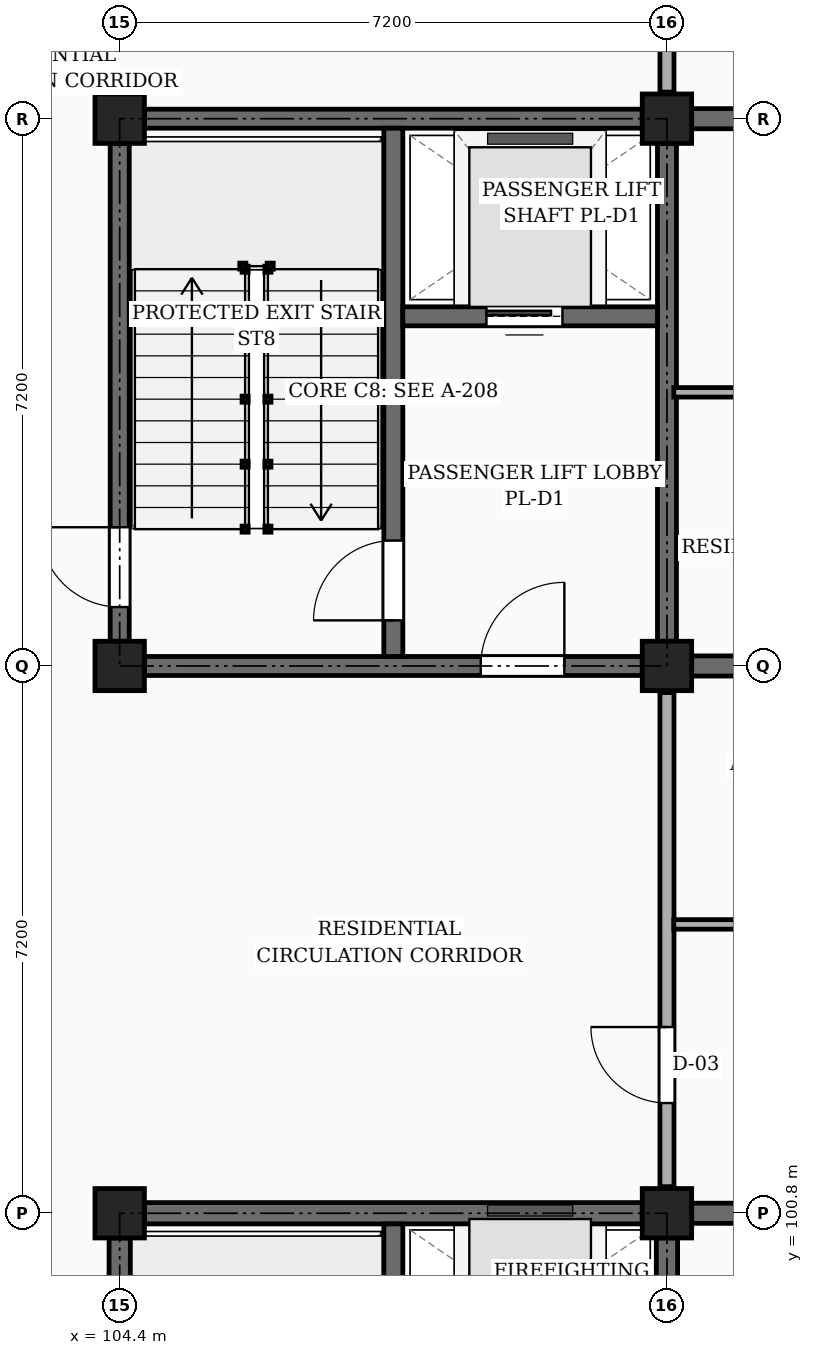
"""IFC4 building model, lengths in metres.
Left out: names, types, materials, properties, quantities, classifications, styles, units other than length and angle.
Written with IfcOpenShell. Run it as: python <this file> out.ifc"""

import sys

from ifc_helpers import new_model, si_unit, direction, frame, frame_2d, origin, origin_2d, place, context, subcontext, project, spatial, rectangle, extrude, element, fill, save


model = new_model("IFC4")
c1 = context("Model", 3, precision=1e-05, world=origin(), true_north=direction((0.0, 1.0)))
c2 = subcontext(c1, "Body", "Model", "MODEL_VIEW")
j1 = project(units=[si_unit("LENGTHUNIT", "METRE"), si_unit("PLANEANGLEUNIT", "RADIAN")], contexts=[c1])
p1 = place(None, origin())
s1 = spatial("IfcSite", under=j1, at=p1, CompositionType="ELEMENT")
p2 = place(p1, origin())
s2 = spatial("IfcBuilding", under=s1, at=p2, CompositionType="ELEMENT")
p3 = place(p2, origin())
s3 = spatial("IfcBuildingStorey", under=s2, at=p3, CompositionType="ELEMENT", Elevation=0.0)
for number, where, z_axis, x_axis in (
    (1, (104.4, 100.8, 0.0), (0.0, 0.0, 1.0), (1.0, 0.0, 0.0)),
    (2, (104.4, 108.0, 0.0), (0.0, 0.0, 1.0), (1.0, 0.0, 0.0)),
    (3, (104.4, 115.2, 0.0), (0.0, 0.0, 1.0), (1.0, 0.0, 0.0)),
    (4, (111.6, 100.8, 0.0), (0.0, 0.0, 1.0), (1.0, 0.0, 0.0)),
    (5, (111.6, 108.0, 0.0), (0.0, 0.0, 1.0), (1.0, 0.0, 0.0)),
    (6, (111.6, 115.2, 0.0), (0.0, 0.0, 1.0), (1.0, 0.0, 0.0)),
):
    element("IfcColumn", number, at=place(p3, frame(where, z_axis=z_axis, x_axis=x_axis)), inside=s3, PredefinedType="COLUMN", context=c2, shape_type="SweptSolid", body=[
        extrude(rectangle(XDim=0.65, YDim=0.65, at=origin_2d()), origin(), (0.0, 0.0, 1.0), 4.5),
    ])
p4 = place(p3, frame((111.925, 100.8, 0.0), z_axis=(0.0, 0.0, 1.0), x_axis=(1.0, 0.0, 0.0)))
e7 = element("IfcWall", 7, at=p4, inside=s3, PredefinedType="SOLIDWALL", context=c2, shape_type="SweptSolid", body=[
    extrude(rectangle(XDim=6.615, YDim=0.265, at=frame_2d((3.308, 0.0))), origin(), (0.0, 0.0, 1.0), 3.54),
])
p5 = place(p3, frame((111.925, 108.0, 0.0), z_axis=(0.0, 0.0, 1.0), x_axis=(1.0, 0.0, 0.0)))
e8 = element("IfcWall", 8, at=p5, inside=s3, PredefinedType="SOLIDWALL", context=c2, shape_type="SweptSolid", body=[
    extrude(rectangle(XDim=6.575, YDim=0.265, at=frame_2d((3.288, 0.0))), origin(), (0.0, 0.0, 1.0), 3.54),
])
p6 = place(p5, frame((4.35, 0.0, 0.0)))
e9 = element("IfcOpeningElement", 9, at=p6, cuts=e8, PredefinedType="OPENING", context=c2, shape_type="SweptSolid", body=[
    extrude(rectangle(XDim=0.98, YDim=2.12, at=frame_2d((0.49, 1.06))), frame((0.0, 0.143, 0.0), z_axis=(0.0, -1.0, 0.0), x_axis=(1.0, 0.0, 0.0)), (0.0, 0.0, 1.0), 0.285),
])
p7 = place(p3, frame((111.925, 115.2, 0.0), z_axis=(0.0, 0.0, 1.0), x_axis=(1.0, 0.0, 0.0)))
e10 = element("IfcWall", 10, at=p7, inside=s3, PredefinedType="SOLIDWALL", context=c2, shape_type="SweptSolid", body=[
    extrude(rectangle(XDim=6.575, YDim=0.265, at=frame_2d((3.288, 0.0))), origin(), (0.0, 0.0, 1.0), 3.54),
])
p8 = place(p3, frame((104.4, 93.925, 0.0), z_axis=(0.0, 0.0, 1.0), x_axis=(0.0, 1.0, 0.0)))
e11 = element("IfcWall", 11, at=p8, inside=s3, PredefinedType="SHEAR", context=c2, shape_type="SweptSolid", body=[
    extrude(rectangle(XDim=6.55, YDim=0.28, at=frame_2d((3.275, 0.0))), origin(), (0.0, 0.0, 1.0), 4.24),
])
p9 = place(p8, frame((0.45, 0.0, 0.0)))
e12 = element("IfcOpeningElement", 12, at=p9, cuts=e11, PredefinedType="OPENING", context=c2, shape_type="SweptSolid", body=[
    extrude(rectangle(XDim=1.05, YDim=2.15, at=frame_2d((0.525, 1.075))), frame((0.0, 0.15, 0.0), z_axis=(0.0, -1.0, 0.0), x_axis=(1.0, 0.0, 0.0)), (0.0, 0.0, 1.0), 0.3),
])
p10 = place(p3, frame((104.725, 100.8, 0.0), z_axis=(0.0, 0.0, 1.0), x_axis=(1.0, 0.0, 0.0)))
e13 = element("IfcWall", 13, at=p10, inside=s3, PredefinedType="SHEAR", context=c2, shape_type="SweptSolid", body=[
    extrude(rectangle(XDim=6.55, YDim=0.28, at=frame_2d((3.275, 0.0))), origin(), (0.0, 0.0, 1.0), 4.24),
])
p11 = place(p3, frame((111.6, 93.925, 0.0), z_axis=(0.0, 0.0, 1.0), x_axis=(0.0, 1.0, 0.0)))
e14 = element("IfcWall", 14, at=p11, inside=s3, PredefinedType="SHEAR", context=c2, shape_type="SweptSolid", body=[
    extrude(rectangle(XDim=6.55, YDim=0.28, at=frame_2d((3.275, 0.0))), origin(), (0.0, 0.0, 1.0), 4.24),
])
p12 = place(p3, frame((108.0, 93.74, 0.0), z_axis=(0.0, 0.0, 1.0), x_axis=(0.0, 1.0, 0.0)))
e15 = element("IfcWall", 15, at=p12, inside=s3, PredefinedType="SHEAR", context=c2, shape_type="SweptSolid", body=[
    extrude(rectangle(XDim=6.92, YDim=0.25, at=frame_2d((3.46, 0.0))), origin(), (0.0, 0.0, 1.0), 4.24),
])
p13 = place(p12, frame((0.46, 0.0, 0.0)))
e16 = element("IfcOpeningElement", 16, at=p13, cuts=e15, PredefinedType="OPENING", context=c2, shape_type="SweptSolid", body=[
    extrude(rectangle(XDim=1.05, YDim=2.15, at=frame_2d((0.525, 1.075))), frame((0.0, 0.135, 0.0), z_axis=(0.0, -1.0, 0.0), x_axis=(1.0, 0.0, 0.0)), (0.0, 0.0, 1.0), 0.27),
])
p14 = place(p3, frame((104.4, 108.325, 0.0), z_axis=(0.0, 0.0, 1.0), x_axis=(0.0, 1.0, 0.0)))
e17 = element("IfcWall", 17, at=p14, inside=s3, PredefinedType="SHEAR", context=c2, shape_type="SweptSolid", body=[
    extrude(rectangle(XDim=6.55, YDim=0.25, at=frame_2d((3.275, 0.0))), origin(), (0.0, 0.0, 1.0), 4.24),
])
p15 = place(p14, frame((0.45, 0.0, 0.0)))
e18 = element("IfcOpeningElement", 18, at=p15, cuts=e17, PredefinedType="OPENING", context=c2, shape_type="SweptSolid", body=[
    extrude(rectangle(XDim=1.05, YDim=2.15, at=frame_2d((0.525, 1.075))), frame((0.0, 0.135, 0.0), z_axis=(0.0, -1.0, 0.0), x_axis=(1.0, 0.0, 0.0)), (0.0, 0.0, 1.0), 0.27),
])
p16 = place(p3, frame((104.725, 115.2, 0.0), z_axis=(0.0, 0.0, 1.0), x_axis=(1.0, 0.0, 0.0)))
e19 = element("IfcWall", 19, at=p16, inside=s3, PredefinedType="SHEAR", context=c2, shape_type="SweptSolid", body=[
    extrude(rectangle(XDim=6.55, YDim=0.25, at=frame_2d((3.275, 0.0))), origin(), (0.0, 0.0, 1.0), 4.24),
])
p17 = place(p3, frame((111.6, 108.325, 0.0), z_axis=(0.0, 0.0, 1.0), x_axis=(0.0, 1.0, 0.0)))
e20 = element("IfcWall", 20, at=p17, inside=s3, PredefinedType="SHEAR", context=c2, shape_type="SweptSolid", body=[
    extrude(rectangle(XDim=6.55, YDim=0.25, at=frame_2d((3.275, 0.0))), origin(), (0.0, 0.0, 1.0), 4.24),
])
p18 = place(p3, frame((104.725, 108.0, 0.0), z_axis=(0.0, 0.0, 1.0), x_axis=(1.0, 0.0, 0.0)))
e21 = element("IfcWall", 21, at=p18, inside=s3, PredefinedType="SHEAR", context=c2, shape_type="SweptSolid", body=[
    extrude(rectangle(XDim=6.55, YDim=0.25, at=frame_2d((3.275, 0.0))), origin(), (0.0, 0.0, 1.0), 4.24),
])
p19 = place(p18, frame((4.425, 0.0, 0.0)))
e22 = element("IfcOpeningElement", 22, at=p19, cuts=e21, PredefinedType="OPENING", context=c2, shape_type="SweptSolid", body=[
    extrude(rectangle(XDim=1.1, YDim=2.15, at=frame_2d((0.55, 1.075))), frame((0.0, 0.135, 0.0), z_axis=(0.0, -1.0, 0.0), x_axis=(1.0, 0.0, 0.0)), (0.0, 0.0, 1.0), 0.27),
])
p20 = place(p3, frame((108.0, 108.125, 0.0), z_axis=(0.0, 0.0, 1.0), x_axis=(0.0, 1.0, 0.0)))
e23 = element("IfcWall", 23, at=p20, inside=s3, PredefinedType="SHEAR", context=c2, shape_type="SweptSolid", body=[
    extrude(rectangle(XDim=6.95, YDim=0.25, at=frame_2d((3.475, 0.0))), origin(), (0.0, 0.0, 1.0), 4.24),
])
p21 = place(p20, frame((0.475, 0.0, 0.0)))
e24 = element("IfcOpeningElement", 24, at=p21, cuts=e23, PredefinedType="OPENING", context=c2, shape_type="SweptSolid", body=[
    extrude(rectangle(XDim=1.05, YDim=2.15, at=frame_2d((0.525, 1.075))), frame((0.0, 0.135, 0.0), z_axis=(0.0, -1.0, 0.0), x_axis=(1.0, 0.0, 0.0)), (0.0, 0.0, 1.0), 0.27),
])
p22 = place(p3, frame((108.125, 112.6, 0.0), z_axis=(0.0, 0.0, 1.0), x_axis=(1.0, 0.0, 0.0)))
e25 = element("IfcWall", 25, at=p22, inside=s3, PredefinedType="SHEAR", context=c2, shape_type="SweptSolid", body=[
    extrude(rectangle(XDim=3.35, YDim=0.25, at=frame_2d((1.675, 0.0))), origin(), (0.0, 0.0, 1.0), 4.24),
])
p23 = place(p22, frame((1.1, 0.0, 0.0)))
e26 = element("IfcOpeningElement", 26, at=p23, cuts=e25, PredefinedType="OPENING", context=c2, shape_type="SweptSolid", body=[
    extrude(rectangle(XDim=1.0, YDim=2.2, at=frame_2d((0.5, 1.1))), frame((0.0, 0.135, 0.0), z_axis=(0.0, -1.0, 0.0), x_axis=(1.0, 0.0, 0.0)), (0.0, 0.0, 1.0), 0.27),
])
p24 = place(p3, frame((111.6, 101.15, 0.0), z_axis=(0.0, 0.0, 1.0), x_axis=(0.0, 1.0, 0.0)))
e27 = element("IfcWall", 27, at=p24, inside=s3, PredefinedType="PARTITIONING", context=c2, shape_type="SweptSolid", body=[
    extrude(rectangle(XDim=6.5, YDim=0.185, at=frame_2d((3.25, 0.0))), origin(), (0.0, 0.0, 1.0), 3.49),
])
p25 = place(p24, frame((1.1, 0.0, 0.0)))
e28 = element("IfcOpeningElement", 28, at=p25, cuts=e27, PredefinedType="OPENING", context=c2, shape_type="SweptSolid", body=[
    extrude(rectangle(XDim=1.0, YDim=2.15, at=frame_2d((0.5, 1.075))), frame((0.0, 0.103, 0.0), z_axis=(0.0, -1.0, 0.0), x_axis=(1.0, 0.0, 0.0)), (0.0, 0.0, 1.0), 0.205),
])
p26 = place(p3, frame((111.6, 115.55, 0.0), z_axis=(0.0, 0.0, 1.0), x_axis=(0.0, 1.0, 0.0)))
e29 = element("IfcWall", 29, at=p26, inside=s3, PredefinedType="PARTITIONING", context=c2, shape_type="SweptSolid", body=[
    extrude(rectangle(XDim=6.5, YDim=0.185, at=frame_2d((3.25, 0.0))), origin(), (0.0, 0.0, 1.0), 3.49),
])
p27 = place(p26, frame((1.1, 0.0, 0.0)))
e30 = element("IfcOpeningElement", 30, at=p27, cuts=e29, PredefinedType="OPENING", context=c2, shape_type="SweptSolid", body=[
    extrude(rectangle(XDim=0.94, YDim=2.12, at=frame_2d((0.47, 1.06))), frame((0.0, 0.103, 0.0), z_axis=(0.0, -1.0, 0.0), x_axis=(1.0, 0.0, 0.0)), (0.0, 0.0, 1.0), 0.205),
])
p28 = place(p3, frame((111.69, 104.6, 0.0), z_axis=(0.0, 0.0, 1.0), x_axis=(1.0, 0.0, 0.0)))
e31 = element("IfcWall", 31, at=p28, inside=s3, PredefinedType="PARTITIONING", context=c2, shape_type="SweptSolid", body=[
    extrude(rectangle(XDim=6.935, YDim=0.125, at=frame_2d((3.468, 0.0))), origin(), (0.0, 0.0, 1.0), 3.675),
])
p29 = place(p28, frame((1.1, 0.0, 0.0)))
e32 = element("IfcOpeningElement", 32, at=p29, cuts=e31, PredefinedType="OPENING", context=c2, shape_type="SweptSolid", body=[
    extrude(rectangle(XDim=0.87, YDim=2.05, at=frame_2d((0.435, 1.025))), frame((0.0, 0.073, 0.0), z_axis=(0.0, -1.0, 0.0), x_axis=(1.0, 0.0, 0.0)), (0.0, 0.0, 1.0), 0.145),
])
p30 = place(p28, frame((4.5, 0.0, 0.0)))
e33 = element("IfcOpeningElement", 33, at=p30, cuts=e31, PredefinedType="OPENING", context=c2, shape_type="SweptSolid", body=[
    extrude(rectangle(XDim=0.92, YDim=2.1, at=frame_2d((0.46, 1.05))), frame((0.0, 0.073, 0.0), z_axis=(0.0, -1.0, 0.0), x_axis=(1.0, 0.0, 0.0)), (0.0, 0.0, 1.0), 0.145),
])
p31 = place(p3, frame((111.69, 111.6, 0.0), z_axis=(0.0, 0.0, 1.0), x_axis=(1.0, 0.0, 0.0)))
e34 = element("IfcWall", 34, at=p31, inside=s3, PredefinedType="PARTITIONING", context=c2, shape_type="SweptSolid", body=[
    extrude(rectangle(XDim=6.935, YDim=0.125, at=frame_2d((3.468, 0.0))), origin(), (0.0, 0.0, 1.0), 3.675),
])
p32 = place(p31, frame((2.6, 0.0, 0.0)))
e35 = element("IfcOpeningElement", 35, at=p32, cuts=e34, PredefinedType="OPENING", context=c2, shape_type="SweptSolid", body=[
    extrude(rectangle(XDim=0.92, YDim=2.1, at=frame_2d((0.46, 1.05))), frame((0.0, 0.073, 0.0), z_axis=(0.0, -1.0, 0.0), x_axis=(1.0, 0.0, 0.0)), (0.0, 0.0, 1.0), 0.145),
])
p33 = place(p15, origin())
e36 = element("IfcDoor", 36, at=p33, inside=s3, OperationType="SINGLE_SWING_RIGHT", PredefinedType="DOOR", context=c2, shape_type="SweptSolid", body=[
    extrude(rectangle(XDim=1.05, YDim=2.15, at=frame_2d((0.525, 1.075))), frame((0.0, 0.025, 0.0), z_axis=(0.0, -1.0, 0.0), x_axis=(1.0, 0.0, 0.0)), (0.0, 0.0, 1.0), 0.05),
])
fill(e18, e36)
p34 = place(p19, frame((1.1, 0.0, 0.0), z_axis=(0.0, 0.0, 1.0), x_axis=(-1.0, 0.0, 0.0)))
e37 = element("IfcDoor", 37, at=p34, inside=s3, OperationType="SINGLE_SWING_RIGHT", PredefinedType="DOOR", context=c2, shape_type="SweptSolid", body=[
    extrude(rectangle(XDim=1.1, YDim=2.15, at=frame_2d((0.55, 1.075))), frame((0.0, 0.025, 0.0), z_axis=(0.0, -1.0, 0.0), x_axis=(1.0, 0.0, 0.0)), (0.0, 0.0, 1.0), 0.05),
])
fill(e22, e37)
p35 = place(p21, frame((1.05, 0.0, 0.0), z_axis=(0.0, 0.0, 1.0), x_axis=(-1.0, 0.0, 0.0)))
e38 = element("IfcDoor", 38, at=p35, inside=s3, OperationType="SINGLE_SWING_LEFT", PredefinedType="DOOR", context=c2, shape_type="SweptSolid", body=[
    extrude(rectangle(XDim=1.05, YDim=2.15, at=frame_2d((0.525, 1.075))), frame((0.0, 0.025, 0.0), z_axis=(0.0, -1.0, 0.0), x_axis=(1.0, 0.0, 0.0)), (0.0, 0.0, 1.0), 0.05),
])
fill(e24, e38)
p36 = place(p23, origin())
e39 = element("IfcDoor", 39, at=p36, inside=s3, OperationType="SLIDING_TO_LEFT", PredefinedType="DOOR", context=c2, shape_type="SweptSolid", body=[
    extrude(rectangle(XDim=1.0, YDim=2.2, at=frame_2d((0.5, 1.1))), frame((0.0, 0.025, 0.0), z_axis=(0.0, -1.0, 0.0), x_axis=(1.0, 0.0, 0.0)), (0.0, 0.0, 1.0), 0.05),
])
fill(e26, e39)
p37 = place(p25, origin())
e40 = element("IfcDoor", 40, at=p37, inside=s3, OperationType="SINGLE_SWING_RIGHT", PredefinedType="DOOR", context=c2, shape_type="SweptSolid", body=[
    extrude(rectangle(XDim=1.0, YDim=2.15, at=frame_2d((0.5, 1.075))), frame((0.0, 0.025, 0.0), z_axis=(0.0, -1.0, 0.0), x_axis=(1.0, 0.0, 0.0)), (0.0, 0.0, 1.0), 0.05),
])
fill(e28, e40)
save(model, sys.argv[1])
